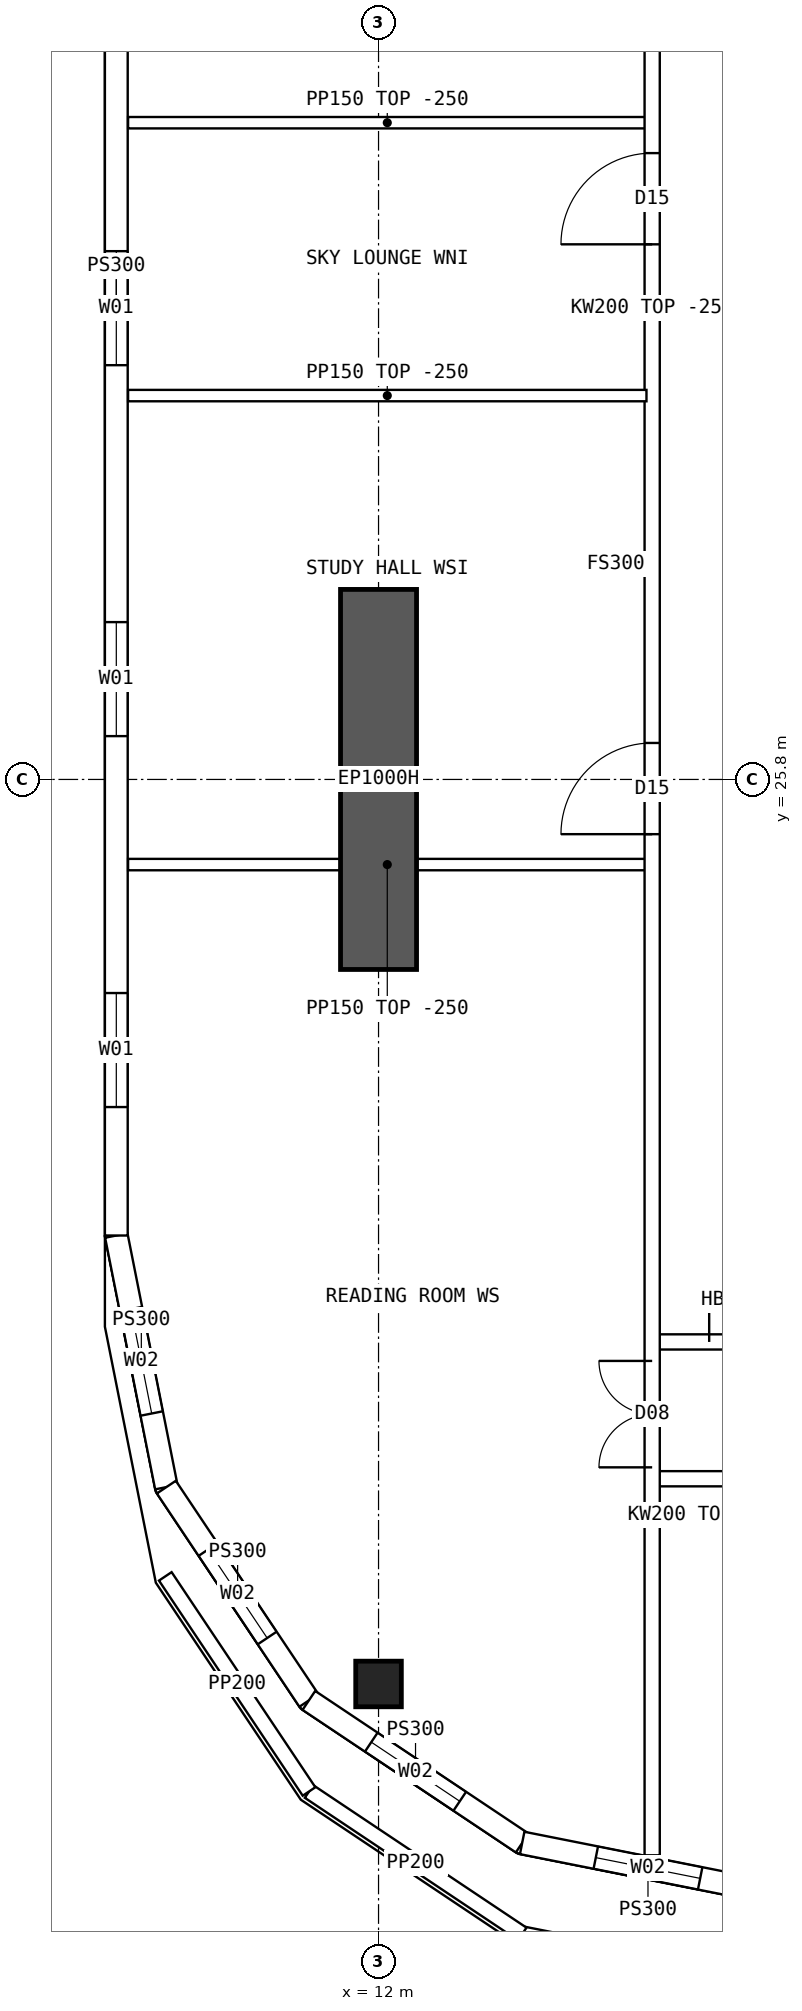
"""IFC4 building model, lengths in metres.
Left out: names, types, materials, properties, quantities, classifications, styles, units other than length and angle.
Written with IfcOpenShell. Run it as: python <this file> out.ifc"""

import sys

from ifc_helpers import new_model, si_unit, direction, frame, frame_2d, origin, origin_2d, place, context, subcontext, project, spatial, polyline, rectangle, hollow_rectangle, outline, extrude, element, fill, save


model = new_model("IFC4")
c1 = context("Model", 3, precision=1e-05, world=origin(), true_north=direction((0.0, 1.0)))
c2 = subcontext(c1, "Body", "Model", "MODEL_VIEW")
j1 = project(units=[si_unit("LENGTHUNIT", "METRE"), si_unit("PLANEANGLEUNIT", "RADIAN")], contexts=[c1])
p1 = place(None, origin())
s1 = spatial("IfcSite", under=j1, at=p1, CompositionType="ELEMENT")
p2 = place(p1, origin())
s2 = spatial("IfcBuilding", under=s1, at=p2, CompositionType="ELEMENT")
p3 = place(p2, frame((0.0, 0.0, 208.3)))
s3 = spatial("IfcBuildingStorey", under=s2, at=p3, CompositionType="ELEMENT", Elevation=208.3)
p4 = place(p3, frame((12.0, 13.9, 0.0), z_axis=(0.0, 0.0, 1.0), x_axis=(1.0, 0.0, 0.0)))
e1 = element("IfcColumn", 1, at=p4, inside=s3, PredefinedType="COLUMN", context=c2, shape_type="SweptSolid", body=[
    extrude(hollow_rectangle(XDim=0.6, YDim=0.6, WallThickness=0.06, at=origin_2d()), origin(), (0.0, 0.0, 1.0), 4.5),
])
p5 = place(p3, frame((12.0, 23.3, 0.0), z_axis=(0.0, 0.0, 1.0), x_axis=(0.0, 1.0, 0.0)))
e2 = element("IfcWall", 2, at=p5, inside=s3, PredefinedType="SHEAR", context=c2, shape_type="SweptSolid", body=[
    extrude(rectangle(XDim=5.0, YDim=1.0, at=frame_2d((2.5, 0.0))), origin(), (0.0, 0.0, 1.0), 4.5),
])
p6 = place(p3, frame((8.55, 44.2, 0.0), z_axis=(0.0, 0.0, 1.0), x_axis=(0.0, -1.0, 0.0)))
e3 = element("IfcWall", 3, at=p6, inside=s3, PredefinedType="SOLIDWALL", context=c2, shape_type="SweptSolid", body=[
    extrude(outline(polyline([(-0.015, -0.15), (24.415, -0.15), (24.385, 0.15), (0.015, 0.15), (-0.015, -0.15)])), origin(), (0.0, 0.0, 1.0), 4.25),
])
p7 = place(p6, frame((1.69, 0.0, 0.9)))
e4 = element("IfcOpeningElement", 4, at=p7, cuts=e3, PredefinedType="OPENING", context=c2, shape_type="SweptSolid", body=[
    extrude(rectangle(XDim=1.5, YDim=2.0, at=frame_2d((0.75, 1.0))), frame((0.0, 0.16, 0.0), z_axis=(0.0, -1.0, 0.0), x_axis=(1.0, 0.0, 0.0)), (0.0, 0.0, 1.0), 0.32),
])
p8 = place(p6, frame((6.57, 0.0, 0.9)))
e5 = element("IfcOpeningElement", 5, at=p8, cuts=e3, PredefinedType="OPENING", context=c2, shape_type="SweptSolid", body=[
    extrude(rectangle(XDim=1.5, YDim=2.0, at=frame_2d((0.75, 1.0))), frame((0.0, 0.16, 0.0), z_axis=(0.0, -1.0, 0.0), x_axis=(1.0, 0.0, 0.0)), (0.0, 0.0, 1.0), 0.32),
])
p9 = place(p6, frame((11.45, 0.0, 0.9)))
e6 = element("IfcOpeningElement", 6, at=p9, cuts=e3, PredefinedType="OPENING", context=c2, shape_type="SweptSolid", body=[
    extrude(rectangle(XDim=1.5, YDim=2.0, at=frame_2d((0.75, 1.0))), frame((0.0, 0.16, 0.0), z_axis=(0.0, -1.0, 0.0), x_axis=(1.0, 0.0, 0.0)), (0.0, 0.0, 1.0), 0.32),
])
p10 = place(p6, frame((16.33, 0.0, 0.9)))
e7 = element("IfcOpeningElement", 7, at=p10, cuts=e3, PredefinedType="OPENING", context=c2, shape_type="SweptSolid", body=[
    extrude(rectangle(XDim=1.5, YDim=2.0, at=frame_2d((0.75, 1.0))), frame((0.0, 0.16, 0.0), z_axis=(0.0, -1.0, 0.0), x_axis=(1.0, 0.0, 0.0)), (0.0, 0.0, 1.0), 0.32),
])
p11 = place(p6, frame((21.21, 0.0, 0.9)))
e8 = element("IfcOpeningElement", 8, at=p11, cuts=e3, PredefinedType="OPENING", context=c2, shape_type="SweptSolid", body=[
    extrude(rectangle(XDim=1.5, YDim=2.0, at=frame_2d((0.75, 1.0))), frame((0.0, 0.16, 0.0), z_axis=(0.0, -1.0, 0.0), x_axis=(1.0, 0.0, 0.0)), (0.0, 0.0, 1.0), 0.32),
])
p12 = place(p3, frame((8.55, 19.8, 0.0), z_axis=(0.0, 0.0, 1.0), x_axis=(0.19508664885, -0.980786011034, 0.0)))
e9 = element("IfcWall", 9, at=p12, inside=s3, PredefinedType="SOLIDWALL", context=c2, shape_type="SweptSolid", body=[
    extrude(outline(polyline([(-0.015, -0.15), (3.405, -0.15), (3.345, 0.15), (0.015, 0.15), (-0.015, -0.15)])), origin(), (0.0, 0.0, 1.0), 4.25),
])
p13 = place(p12, frame((0.988, 0.0, 0.9)))
e10 = element("IfcOpeningElement", 10, at=p13, cuts=e9, PredefinedType="OPENING", context=c2, shape_type="SweptSolid", body=[
    extrude(rectangle(XDim=1.4, YDim=1.8, at=frame_2d((0.7, 0.9))), frame((0.0, 0.16, 0.0), z_axis=(0.0, -1.0, 0.0), x_axis=(1.0, 0.0, 0.0)), (0.0, 0.0, 1.0), 0.32),
])
p14 = place(p3, frame((9.208, 16.49, 0.0), z_axis=(0.0, 0.0, 1.0), x_axis=(0.555567969291, -0.831471124873, 0.0)))
e11 = element("IfcWall", 11, at=p14, inside=s3, PredefinedType="SOLIDWALL", context=c2, shape_type="SweptSolid", body=[
    extrude(outline(polyline([(-0.03, -0.15), (3.405, -0.15), (3.345, 0.15), (0.03, 0.15), (-0.03, -0.15)])), origin(), (0.0, 0.0, 1.0), 4.25),
])
p15 = place(p14, frame((0.988, 0.0, 0.9)))
e12 = element("IfcOpeningElement", 12, at=p15, cuts=e11, PredefinedType="OPENING", context=c2, shape_type="SweptSolid", body=[
    extrude(rectangle(XDim=1.4, YDim=1.8, at=frame_2d((0.7, 0.9))), frame((0.0, 0.16, 0.0), z_axis=(0.0, -1.0, 0.0), x_axis=(1.0, 0.0, 0.0)), (0.0, 0.0, 1.0), 0.32),
])
p16 = place(p3, frame((11.083, 13.684, 0.0), z_axis=(0.0, 0.0, 1.0), x_axis=(0.831460037396, -0.555584562613, 0.0)))
e13 = element("IfcWall", 13, at=p16, inside=s3, PredefinedType="SOLIDWALL", context=c2, shape_type="SweptSolid", body=[
    extrude(outline(polyline([(-0.03, -0.15), (3.405, -0.15), (3.345, 0.15), (0.03, 0.15), (-0.03, -0.15)])), origin(), (0.0, 0.0, 1.0), 4.25),
])
p17 = place(p16, frame((0.988, 0.0, 0.9)))
e14 = element("IfcOpeningElement", 14, at=p17, cuts=e13, PredefinedType="OPENING", context=c2, shape_type="SweptSolid", body=[
    extrude(rectangle(XDim=1.4, YDim=1.8, at=frame_2d((0.7, 0.9))), frame((0.0, 0.16, 0.0), z_axis=(0.0, -1.0, 0.0), x_axis=(1.0, 0.0, 0.0)), (0.0, 0.0, 1.0), 0.32),
])
p18 = place(p3, frame((13.89, 11.808, 0.0), z_axis=(0.0, 0.0, 1.0), x_axis=(0.98078325777, -0.195100490205, 0.0)))
e15 = element("IfcWall", 15, at=p18, inside=s3, PredefinedType="SOLIDWALL", context=c2, shape_type="SweptSolid", body=[
    extrude(outline(polyline([(-0.03, -0.15), (3.405, -0.15), (3.345, 0.15), (0.03, 0.15), (-0.03, -0.15)])), origin(), (0.0, 0.0, 1.0), 4.25),
])
p19 = place(p18, frame((0.988, 0.0, 0.9)))
e16 = element("IfcOpeningElement", 16, at=p19, cuts=e15, PredefinedType="OPENING", context=c2, shape_type="SweptSolid", body=[
    extrude(rectangle(XDim=1.4, YDim=1.8, at=frame_2d((0.7, 0.9))), frame((0.0, 0.16, 0.0), z_axis=(0.0, -1.0, 0.0), x_axis=(1.0, 0.0, 0.0)), (0.0, 0.0, 1.0), 0.32),
])
p20 = place(p3, frame((17.215, 9.95, 0.0), z_axis=(0.0, 0.0, 1.0), x_axis=(-0.980787925163, 0.195077025438, 0.0)))
e17 = element("IfcWall", 17, at=p20, inside=s3, PredefinedType="PARAPET", context=c2, shape_type="SweptSolid", body=[
    extrude(rectangle(XDim=3.389, YDim=0.2, at=frame_2d((1.695, 0.0))), origin(), (0.0, 0.0, 1.0), 1.1),
])
p21 = place(p3, frame((13.891, 10.611, 0.0), z_axis=(0.0, 0.0, 1.0), x_axis=(-0.831448637767, 0.555601622348, 0.0)))
e18 = element("IfcWall", 18, at=p21, inside=s3, PredefinedType="PARAPET", context=c2, shape_type="SweptSolid", body=[
    extrude(rectangle(XDim=3.374, YDim=0.2, at=frame_2d((1.687, 0.0))), origin(), (0.0, 0.0, 1.0), 1.1),
])
p22 = place(p3, frame((11.086, 12.486, 0.0), z_axis=(0.0, 0.0, 1.0), x_axis=(-0.555593699073, 0.831453932308, 0.0)))
e19 = element("IfcWall", 19, at=p22, inside=s3, PredefinedType="PARAPET", context=c2, shape_type="SweptSolid", body=[
    extrude(rectangle(XDim=3.404, YDim=0.2, at=frame_2d((1.702, 0.0))), origin(), (0.0, 0.0, 1.0), 1.1),
])
p23 = place(p3, frame((15.6, 16.6, 0.0), z_axis=(0.0, 0.0, 1.0), x_axis=(1.0, 0.0, 0.0)))
e20 = element("IfcWall", 20, at=p23, inside=s3, PredefinedType="SOLIDWALL", context=c2, shape_type="SweptSolid", body=[
    extrude(rectangle(XDim=2.05, YDim=0.2, at=frame_2d((1.025, 0.0))), origin(), (0.0, 0.0, 1.0), 4.25),
])
p24 = place(p23, frame((0.95, 0.0, 0.0)))
e21 = element("IfcOpeningElement", 21, at=p24, cuts=e20, PredefinedType="OPENING", context=c2, shape_type="SweptSolid", body=[
    extrude(rectangle(XDim=0.9, YDim=2.1, at=frame_2d((0.45, 1.05))), frame((0.0, 0.11, 0.0), z_axis=(0.0, -1.0, 0.0), x_axis=(1.0, 0.0, 0.0)), (0.0, 0.0, 1.0), 0.22),
])
p25 = place(p3, frame((15.6, 18.4, 0.0), z_axis=(0.0, 0.0, 1.0), x_axis=(1.0, 0.0, 0.0)))
e22 = element("IfcWall", 22, at=p25, inside=s3, PredefinedType="SOLIDWALL", context=c2, shape_type="SweptSolid", body=[
    extrude(rectangle(XDim=2.05, YDim=0.2, at=frame_2d((1.025, 0.0))), origin(), (0.0, 0.0, 1.0), 4.25),
])
p26 = place(p25, frame((0.75, 0.0, 0.0)))
e23 = element("IfcOpeningElement", 23, at=p26, cuts=e22, PredefinedType="OPENING", context=c2, shape_type="SweptSolid", body=[
    extrude(rectangle(XDim=1.2, YDim=2.1, at=frame_2d((0.6, 1.05))), frame((0.0, 0.11, 0.0), z_axis=(0.0, -1.0, 0.0), x_axis=(1.0, 0.0, 0.0)), (0.0, 0.0, 1.0), 0.22),
])
p27 = place(p3, frame((8.705, 30.85, 0.0), z_axis=(0.0, 0.0, 1.0), x_axis=(1.0, 0.0, 0.0)))
e24 = element("IfcWall", 24, at=p27, inside=s3, PredefinedType="PARTITIONING", context=c2, shape_type="SweptSolid", body=[
    extrude(outline(polyline([(0.0, 0.0), (6.82, 0.0), (6.82, 4.25), (3.597, 4.25), (3.595, 3.8), (2.997, 3.8), (2.995, 4.25), (0.0, 4.25), (0.0, 0.0)])), frame((0.0, 0.075, 0.0), z_axis=(0.0, -1.0, 0.0), x_axis=(1.0, 0.0, 0.0)), (0.0, 0.0, 1.0), 0.15),
])
p28 = place(p3, frame((15.6, 11.646, 0.0), z_axis=(0.0, 0.0, 1.0), x_axis=(0.0, 1.0, 0.0)))
e25 = element("IfcWall", 25, at=p28, inside=s3, PredefinedType="SOLIDWALL", context=c2, shape_type="SweptSolid", body=[
    extrude(rectangle(XDim=40.708, YDim=0.2, at=frame_2d((20.354, 0.0))), origin(), (0.0, 0.0, 1.0), 4.25),
])
p29 = place(p28, frame((13.434, 0.0, 0.0)))
e26 = element("IfcOpeningElement", 26, at=p29, cuts=e25, PredefinedType="OPENING", context=c2, shape_type="SweptSolid", body=[
    extrude(rectangle(XDim=1.2, YDim=2.1, at=frame_2d((0.6, 1.05))), frame((0.0, 0.11, 0.0), z_axis=(0.0, -1.0, 0.0), x_axis=(1.0, 0.0, 0.0)), (0.0, 0.0, 1.0), 0.22),
])
p30 = place(p28, frame((21.194, 0.0, 0.0)))
e27 = element("IfcOpeningElement", 27, at=p30, cuts=e25, PredefinedType="OPENING", context=c2, shape_type="SweptSolid", body=[
    extrude(rectangle(XDim=1.2, YDim=2.1, at=frame_2d((0.6, 1.05))), frame((0.0, 0.11, 0.0), z_axis=(0.0, -1.0, 0.0), x_axis=(1.0, 0.0, 0.0)), (0.0, 0.0, 1.0), 0.22),
])
p31 = place(p28, frame((5.104, 0.0, 0.0)))
e28 = element("IfcOpeningElement", 28, at=p31, cuts=e25, PredefinedType="OPENING", context=c2, shape_type="SweptSolid", body=[
    extrude(rectangle(XDim=1.4, YDim=2.1, at=frame_2d((0.7, 1.05))), frame((0.0, 0.11, 0.0), z_axis=(0.0, -1.0, 0.0), x_axis=(1.0, 0.0, 0.0)), (0.0, 0.0, 1.0), 0.22),
])
p32 = place(p28, frame((34.104, 0.0, 0.0)))
e29 = element("IfcOpeningElement", 29, at=p32, cuts=e25, PredefinedType="OPENING", context=c2, shape_type="SweptSolid", body=[
    extrude(rectangle(XDim=1.4, YDim=2.1, at=frame_2d((0.7, 1.05))), frame((0.0, 0.11, 0.0), z_axis=(0.0, -1.0, 0.0), x_axis=(1.0, 0.0, 0.0)), (0.0, 0.0, 1.0), 0.22),
])
p33 = place(p3, frame((8.705, 24.68, 0.0), z_axis=(0.0, 0.0, 1.0), x_axis=(1.0, 0.0, 0.0)))
e30 = element("IfcWall", 30, at=p33, inside=s3, PredefinedType="PARTITIONING", context=c2, shape_type="SweptSolid", body=[
    extrude(rectangle(XDim=6.82, YDim=0.15, at=frame_2d((3.41, 0.0))), origin(), (0.0, 0.0, 1.0), 4.25),
])
p34 = place(p3, frame((8.705, 34.44, 0.0), z_axis=(0.0, 0.0, 1.0), x_axis=(1.0, 0.0, 0.0)))
e31 = element("IfcWall", 31, at=p34, inside=s3, PredefinedType="PARTITIONING", context=c2, shape_type="SweptSolid", body=[
    extrude(outline(polyline([(0.0, 0.0), (6.82, 0.0), (6.82, 4.25), (3.597, 4.25), (3.595, 3.8), (2.997, 3.8), (2.995, 4.25), (0.0, 4.25), (0.0, 0.0)])), frame((0.0, 0.075, 0.0), z_axis=(0.0, -1.0, 0.0), x_axis=(1.0, 0.0, 0.0)), (0.0, 0.0, 1.0), 0.15),
])
p35 = place(p9, origin())
e32 = element("IfcWindow", 32, at=p35, inside=s3, PartitioningType="SINGLE_PANEL", PredefinedType="WINDOW", context=c2, shape_type="SweptSolid", body=[
    extrude(rectangle(XDim=1.5, YDim=2.0, at=frame_2d((0.75, 1.0))), frame((0.0, 0.03, 0.0), z_axis=(0.0, -1.0, 0.0), x_axis=(1.0, 0.0, 0.0)), (0.0, 0.0, 1.0), 0.06),
])
fill(e6, e32)
p36 = place(p10, origin())
e33 = element("IfcWindow", 33, at=p36, inside=s3, PartitioningType="SINGLE_PANEL", PredefinedType="WINDOW", context=c2, shape_type="SweptSolid", body=[
    extrude(rectangle(XDim=1.5, YDim=2.0, at=frame_2d((0.75, 1.0))), frame((0.0, 0.03, 0.0), z_axis=(0.0, -1.0, 0.0), x_axis=(1.0, 0.0, 0.0)), (0.0, 0.0, 1.0), 0.06),
])
fill(e7, e33)
p37 = place(p11, origin())
e34 = element("IfcWindow", 34, at=p37, inside=s3, PartitioningType="SINGLE_PANEL", PredefinedType="WINDOW", context=c2, shape_type="SweptSolid", body=[
    extrude(rectangle(XDim=1.5, YDim=2.0, at=frame_2d((0.75, 1.0))), frame((0.0, 0.03, 0.0), z_axis=(0.0, -1.0, 0.0), x_axis=(1.0, 0.0, 0.0)), (0.0, 0.0, 1.0), 0.06),
])
fill(e8, e34)
p38 = place(p13, origin())
e35 = element("IfcWindow", 35, at=p38, inside=s3, PartitioningType="SINGLE_PANEL", PredefinedType="WINDOW", context=c2, shape_type="SweptSolid", body=[
    extrude(rectangle(XDim=1.4, YDim=1.8, at=frame_2d((0.7, 0.9))), frame((0.0, 0.03, 0.0), z_axis=(0.0, -1.0, 0.0), x_axis=(1.0, 0.0, 0.0)), (0.0, 0.0, 1.0), 0.06),
])
fill(e10, e35)
p39 = place(p15, origin())
e36 = element("IfcWindow", 36, at=p39, inside=s3, PartitioningType="SINGLE_PANEL", PredefinedType="WINDOW", context=c2, shape_type="SweptSolid", body=[
    extrude(rectangle(XDim=1.4, YDim=1.8, at=frame_2d((0.7, 0.9))), frame((0.0, 0.03, 0.0), z_axis=(0.0, -1.0, 0.0), x_axis=(1.0, 0.0, 0.0)), (0.0, 0.0, 1.0), 0.06),
])
fill(e12, e36)
p40 = place(p17, origin())
e37 = element("IfcWindow", 37, at=p40, inside=s3, PartitioningType="SINGLE_PANEL", PredefinedType="WINDOW", context=c2, shape_type="SweptSolid", body=[
    extrude(rectangle(XDim=1.4, YDim=1.8, at=frame_2d((0.7, 0.9))), frame((0.0, 0.03, 0.0), z_axis=(0.0, -1.0, 0.0), x_axis=(1.0, 0.0, 0.0)), (0.0, 0.0, 1.0), 0.06),
])
fill(e14, e37)
p41 = place(p19, origin())
e38 = element("IfcWindow", 38, at=p41, inside=s3, PartitioningType="SINGLE_PANEL", PredefinedType="WINDOW", context=c2, shape_type="SweptSolid", body=[
    extrude(rectangle(XDim=1.4, YDim=1.8, at=frame_2d((0.7, 0.9))), frame((0.0, 0.03, 0.0), z_axis=(0.0, -1.0, 0.0), x_axis=(1.0, 0.0, 0.0)), (0.0, 0.0, 1.0), 0.06),
])
fill(e16, e38)
p42 = place(p26, origin())
e39 = element("IfcDoor", 39, at=p42, inside=s3, OperationType="DOUBLE_DOOR_SINGLE_SWING", PredefinedType="DOOR", context=c2, shape_type="SweptSolid", body=[
    extrude(rectangle(XDim=1.2, YDim=2.1, at=frame_2d((0.6, 1.05))), frame((0.0, 0.025, 0.0), z_axis=(0.0, -1.0, 0.0), x_axis=(1.0, 0.0, 0.0)), (0.0, 0.0, 1.0), 0.05),
])
fill(e23, e39)
p43 = place(p29, origin())
e40 = element("IfcDoor", 40, at=p43, inside=s3, OperationType="SINGLE_SWING_LEFT", PredefinedType="DOOR", context=c2, shape_type="SweptSolid", body=[
    extrude(rectangle(XDim=1.2, YDim=2.1, at=frame_2d((0.6, 1.05))), frame((0.0, 0.025, 0.0), z_axis=(0.0, -1.0, 0.0), x_axis=(1.0, 0.0, 0.0)), (0.0, 0.0, 1.0), 0.05),
])
fill(e26, e40)
p44 = place(p30, origin())
e41 = element("IfcDoor", 41, at=p44, inside=s3, OperationType="SINGLE_SWING_LEFT", PredefinedType="DOOR", context=c2, shape_type="SweptSolid", body=[
    extrude(rectangle(XDim=1.2, YDim=2.1, at=frame_2d((0.6, 1.05))), frame((0.0, 0.025, 0.0), z_axis=(0.0, -1.0, 0.0), x_axis=(1.0, 0.0, 0.0)), (0.0, 0.0, 1.0), 0.05),
])
fill(e27, e41)
p45 = place(p31, origin())
e42 = element("IfcDoor", 42, at=p45, inside=s3, OperationType="DOUBLE_DOOR_SINGLE_SWING", PredefinedType="DOOR", context=c2, shape_type="SweptSolid", body=[
    extrude(rectangle(XDim=1.4, YDim=2.1, at=frame_2d((0.7, 1.05))), frame((0.0, 0.025, 0.0), z_axis=(0.0, -1.0, 0.0), x_axis=(1.0, 0.0, 0.0)), (0.0, 0.0, 1.0), 0.05),
])
fill(e28, e42)
save(model, sys.argv[1])
